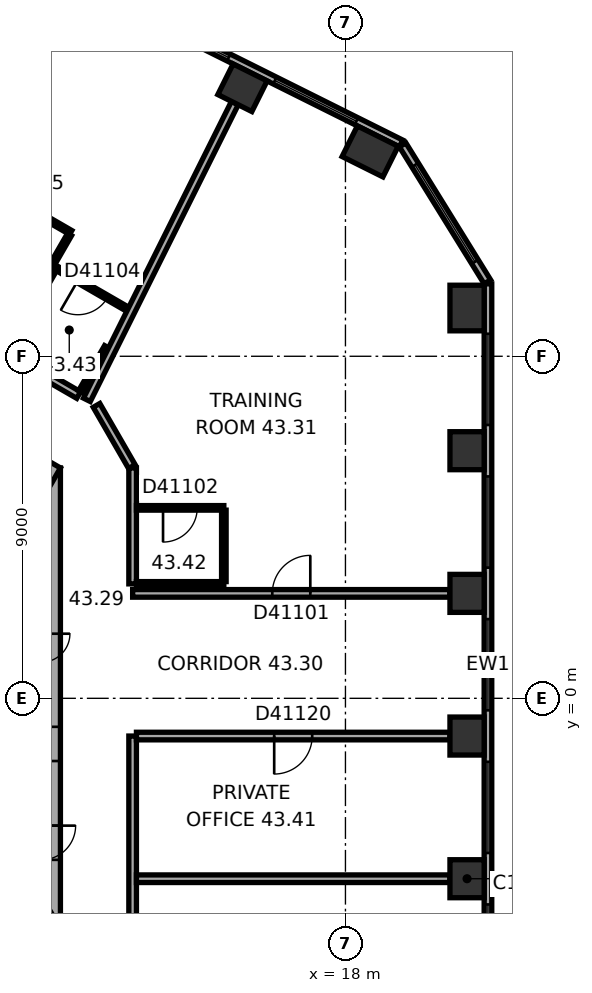
"""IFC4 building model, lengths in metres.
Left out: names, types, materials, properties, quantities, classifications, styles, units other than length and angle.
Written with IfcOpenShell. Run it as: python <this file> out.ifc"""

import sys

from ifc_helpers import new_model, si_unit, direction, frame, frame_2d, origin, origin_2d, place, context, subcontext, project, spatial, rectangle, extrude, element, fill, save


model = new_model("IFC4")
c1 = context("Model", 3, precision=1e-05, world=origin(), true_north=direction((0.0, 1.0)))
c2 = subcontext(c1, "Body", "Model", "MODEL_VIEW")
j1 = project(units=[si_unit("LENGTHUNIT", "METRE"), si_unit("PLANEANGLEUNIT", "RADIAN")], contexts=[c1])
p1 = place(None, origin())
s1 = spatial("IfcSite", under=j1, at=p1, CompositionType="ELEMENT")
p2 = place(p1, origin())
s2 = spatial("IfcBuilding", under=s1, at=p2, CompositionType="ELEMENT")
p3 = place(p2, frame((0.0, 0.0, 176.2)))
s3 = spatial("IfcBuildingStorey", under=s2, at=p3, CompositionType="ELEMENT", Elevation=176.2)
for number, where, z_axis, x_axis in (
    (1, (21.2, -4.747, 0.0), (0.0, 0.0, 1.0), (0.0, 1.0, 0.0)),
    (2, (21.2, -0.993, 0.0), (0.0, 0.0, 1.0), (0.0, 1.0, 0.0)),
    (3, (21.2, 2.761, 0.0), (0.0, 0.0, 1.0), (0.0, 1.0, 0.0)),
    (4, (21.2, 6.515, 0.0), (0.0, 0.0, 1.0), (0.0, 1.0, 0.0)),
):
    element("IfcColumn", number, at=place(p3, frame(where, z_axis=z_axis, x_axis=x_axis)), inside=s3, PredefinedType="COLUMN", context=c2, shape_type="SweptSolid", body=[
        extrude(rectangle(XDim=1.0, YDim=0.9, at=origin_2d()), origin(), (0.0, 0.0, 1.0), 3.7),
    ])
for number, where, z_axis, x_axis in (
    (5, (21.2, 10.27, 0.0), (0.0, 0.0, 1.0), (0.0, 1.0, 0.0)),
    (6, (18.65, 14.39, 0.0), (0.0, 0.0, 1.0), (-0.895, 0.446, 0.0)),
):
    element("IfcColumn", number, at=place(p3, frame(where, z_axis=z_axis, x_axis=x_axis)), inside=s3, PredefinedType="COLUMN", context=c2, shape_type="SweptSolid", body=[
        extrude(rectangle(XDim=1.2, YDim=0.9, at=origin_2d()), origin(), (0.0, 0.0, 1.0), 3.7),
    ])
p4 = place(p3, frame((15.29, 16.065, 0.0), z_axis=(0.0, 0.0, 1.0), x_axis=(-0.894934361602, 0.44619781311, 0.0)))
e7 = element("IfcColumn", 7, at=p4, inside=s3, PredefinedType="COLUMN", context=c2, shape_type="SweptSolid", body=[
    extrude(rectangle(XDim=1.0, YDim=0.9, at=origin_2d()), origin(), (0.0, 0.0, 1.0), 3.7),
])
p5 = place(p3, frame((10.0, -6.062, 0.0), z_axis=(0.0, 0.0, 1.0), x_axis=(0.0, 1.0, 0.0)))
e8 = element("IfcWall", 8, at=p5, inside=s3, PredefinedType="SHEAR", context=c2, shape_type="SweptSolid", body=[
    extrude(rectangle(XDim=12.125, YDim=1.0, at=frame_2d((6.062, 0.0))), origin(), (0.0, 0.0, 1.0), 3.7),
])
p6 = place(p5, frame((6.262, 0.0, 0.0)))
e9 = element("IfcOpeningElement", 9, at=p6, cuts=e8, PredefinedType="OPENING", context=c2, shape_type="SweptSolid", body=[
    extrude(rectangle(XDim=1.5, YDim=2.1, at=frame_2d((0.75, 1.05))), frame((0.0, 0.51, 0.0), z_axis=(0.0, -1.0, 0.0), x_axis=(1.0, 0.0, 0.0)), (0.0, 0.0, 1.0), 1.02),
])
p7 = place(p5, frame((1.812, 0.0, 0.0)))
e10 = element("IfcOpeningElement", 10, at=p7, cuts=e8, PredefinedType="OPENING", context=c2, shape_type="SweptSolid", body=[
    extrude(rectangle(XDim=0.9, YDim=2.1, at=frame_2d((0.45, 1.05))), frame((0.0, 0.51, 0.0), z_axis=(0.0, -1.0, 0.0), x_axis=(1.0, 0.0, 0.0)), (0.0, 0.0, 1.0), 1.02),
])
p8 = place(p5, frame((4.412, 0.0, 0.0)))
e11 = element("IfcOpeningElement", 11, at=p8, cuts=e8, PredefinedType="OPENING", context=c2, shape_type="SweptSolid", body=[
    extrude(rectangle(XDim=0.9, YDim=2.1, at=frame_2d((0.45, 1.05))), frame((0.0, 0.51, 0.0), z_axis=(0.0, -1.0, 0.0), x_axis=(1.0, 0.0, 0.0)), (0.0, 0.0, 1.0), 1.02),
])
p9 = place(p3, frame((10.25, 5.629, 0.0), z_axis=(0.0, 0.0, 1.0), x_axis=(-0.866022616891, 0.50000482701, 0.0)))
e12 = element("IfcWall", 12, at=p9, inside=s3, PredefinedType="SHEAR", context=c2, shape_type="SweptSolid", body=[
    extrude(rectangle(XDim=12.125, YDim=1.0, at=frame_2d((6.062, 0.0))), origin(), (0.0, 0.0, 1.0), 3.7),
])
p10 = place(p9, frame((4.012, 0.0, 0.0)))
e13 = element("IfcOpeningElement", 13, at=p10, cuts=e12, PredefinedType="OPENING", context=c2, shape_type="SweptSolid", body=[
    extrude(rectangle(XDim=0.9, YDim=2.1, at=frame_2d((0.45, 1.05))), frame((0.0, 0.51, 0.0), z_axis=(0.0, -1.0, 0.0), x_axis=(1.0, 0.0, 0.0)), (0.0, 0.0, 1.0), 1.02),
])
p11 = place(p9, frame((7.912, 0.0, 0.0)))
e14 = element("IfcOpeningElement", 14, at=p11, cuts=e12, PredefinedType="OPENING", context=c2, shape_type="SweptSolid", body=[
    extrude(rectangle(XDim=0.9, YDim=2.1, at=frame_2d((0.45, 1.05))), frame((0.0, 0.51, 0.0), z_axis=(0.0, -1.0, 0.0), x_axis=(1.0, 0.0, 0.0)), (0.0, 0.0, 1.0), 1.02),
])
p12 = place(p3, frame((-0.25, -11.691, 0.0), z_axis=(0.0, 0.0, 1.0), x_axis=(0.866022616891, 0.50000482701, 0.0)))
e15 = element("IfcWall", 15, at=p12, inside=s3, PredefinedType="SHEAR", context=c2, shape_type="SweptSolid", body=[
    extrude(rectangle(XDim=12.125, YDim=1.0, at=frame_2d((6.062, 0.0))), origin(), (0.0, 0.0, 1.0), 3.7),
])
p13 = place(p12, frame((2.612, 0.0, 0.0)))
e16 = element("IfcOpeningElement", 16, at=p13, cuts=e15, PredefinedType="OPENING", context=c2, shape_type="SweptSolid", body=[
    extrude(rectangle(XDim=1.1, YDim=2.1, at=frame_2d((0.55, 1.05))), frame((0.0, 0.51, 0.0), z_axis=(0.0, -1.0, 0.0), x_axis=(1.0, 0.0, 0.0)), (0.0, 0.0, 1.0), 1.02),
])
p14 = place(p12, frame((5.212, 0.0, 0.0)))
e17 = element("IfcOpeningElement", 17, at=p14, cuts=e15, PredefinedType="OPENING", context=c2, shape_type="SweptSolid", body=[
    extrude(rectangle(XDim=1.1, YDim=2.1, at=frame_2d((0.55, 1.05))), frame((0.0, 0.51, 0.0), z_axis=(0.0, -1.0, 0.0), x_axis=(1.0, 0.0, 0.0)), (0.0, 0.0, 1.0), 1.02),
])
p15 = place(p12, frame((7.812, 0.0, 0.0)))
e18 = element("IfcOpeningElement", 18, at=p15, cuts=e15, PredefinedType="OPENING", context=c2, shape_type="SweptSolid", body=[
    extrude(rectangle(XDim=1.1, YDim=2.1, at=frame_2d((0.55, 1.05))), frame((0.0, 0.51, 0.0), z_axis=(0.0, -1.0, 0.0), x_axis=(1.0, 0.0, 0.0)), (0.0, 0.0, 1.0), 1.02),
])
p16 = place(p3, frame((21.75, -9.138, 0.0), z_axis=(0.0, 0.0, 1.0), x_axis=(0.0, 1.0, 0.0)))
e19 = element("IfcWall", 19, at=p16, inside=s3, PredefinedType="STANDARD", context=c2, shape_type="SweptSolid", body=[
    extrude(rectangle(XDim=20.044, YDim=0.2, at=frame_2d((10.022, 0.0))), origin(), (0.0, 0.0, 1.0), 3.7),
])
p17 = place(p16, frame((1.314, 0.0, 0.9)))
e20 = element("IfcOpeningElement", 20, at=p17, cuts=e19, PredefinedType="OPENING", context=c2, shape_type="SweptSolid", body=[
    extrude(rectangle(XDim=2.4, YDim=2.0, at=frame_2d((1.2, 1.0))), frame((0.0, 0.11, 0.0), z_axis=(0.0, -1.0, 0.0), x_axis=(1.0, 0.0, 0.0)), (0.0, 0.0, 1.0), 0.22),
])
p18 = place(p16, frame((5.069, 0.0, 0.9)))
e21 = element("IfcOpeningElement", 21, at=p18, cuts=e19, PredefinedType="OPENING", context=c2, shape_type="SweptSolid", body=[
    extrude(rectangle(XDim=2.4, YDim=2.0, at=frame_2d((1.2, 1.0))), frame((0.0, 0.11, 0.0), z_axis=(0.0, -1.0, 0.0), x_axis=(1.0, 0.0, 0.0)), (0.0, 0.0, 1.0), 0.22),
])
p19 = place(p16, frame((8.823, 0.0, 0.9)))
e22 = element("IfcOpeningElement", 22, at=p19, cuts=e19, PredefinedType="OPENING", context=c2, shape_type="SweptSolid", body=[
    extrude(rectangle(XDim=2.4, YDim=2.0, at=frame_2d((1.2, 1.0))), frame((0.0, 0.11, 0.0), z_axis=(0.0, -1.0, 0.0), x_axis=(1.0, 0.0, 0.0)), (0.0, 0.0, 1.0), 0.22),
])
p20 = place(p16, frame((12.577, 0.0, 0.9)))
e23 = element("IfcOpeningElement", 23, at=p20, cuts=e19, PredefinedType="OPENING", context=c2, shape_type="SweptSolid", body=[
    extrude(rectangle(XDim=2.4, YDim=2.0, at=frame_2d((1.2, 1.0))), frame((0.0, 0.11, 0.0), z_axis=(0.0, -1.0, 0.0), x_axis=(1.0, 0.0, 0.0)), (0.0, 0.0, 1.0), 0.22),
])
p21 = place(p16, frame((16.331, 0.0, 0.9)))
e24 = element("IfcOpeningElement", 24, at=p21, cuts=e19, PredefinedType="OPENING", context=c2, shape_type="SweptSolid", body=[
    extrude(rectangle(XDim=2.4, YDim=2.0, at=frame_2d((1.2, 1.0))), frame((0.0, 0.11, 0.0), z_axis=(0.0, -1.0, 0.0), x_axis=(1.0, 0.0, 0.0)), (0.0, 0.0, 1.0), 0.22),
])
p22 = place(p3, frame((21.735, 10.958, 0.0), z_axis=(0.0, 0.0, 1.0), x_axis=(-0.526213807775, 0.850352296702, 0.0)))
e25 = element("IfcWall", 25, at=p22, inside=s3, PredefinedType="STANDARD", context=c2, shape_type="SweptSolid", body=[
    extrude(rectangle(XDim=4.238, YDim=0.2, at=frame_2d((2.119, 0.0))), origin(), (0.0, 0.0, 1.0), 3.7),
])
p23 = place(p22, frame((0.619, 0.0, 0.9)))
e26 = element("IfcOpeningElement", 26, at=p23, cuts=e25, PredefinedType="OPENING", context=c2, shape_type="SweptSolid", body=[
    extrude(rectangle(XDim=3.0, YDim=2.0, at=frame_2d((1.5, 1.0))), frame((0.0, 0.11, 0.0), z_axis=(0.0, -1.0, 0.0), x_axis=(1.0, 0.0, 0.0)), (0.0, 0.0, 1.0), 0.22),
])
p24 = place(p3, frame((19.464, 14.599, 0.0), z_axis=(0.0, 0.0, 1.0), x_axis=(-0.894935755043, 0.446195018289, 0.0)))
e27 = element("IfcWall", 27, at=p24, inside=s3, PredefinedType="STANDARD", context=c2, shape_type="SweptSolid", body=[
    extrude(rectangle(XDim=20.044, YDim=0.2, at=frame_2d((10.022, 0.0))), origin(), (0.0, 0.0, 1.0), 3.7),
])
p25 = place(p24, frame((1.313, 0.0, 0.9)))
e28 = element("IfcOpeningElement", 28, at=p25, cuts=e27, PredefinedType="OPENING", context=c2, shape_type="SweptSolid", body=[
    extrude(rectangle(XDim=2.4, YDim=2.0, at=frame_2d((1.2, 1.0))), frame((0.0, 0.11, 0.0), z_axis=(0.0, -1.0, 0.0), x_axis=(1.0, 0.0, 0.0)), (0.0, 0.0, 1.0), 0.22),
])
p26 = place(p24, frame((5.067, 0.0, 0.9)))
e29 = element("IfcOpeningElement", 29, at=p26, cuts=e27, PredefinedType="OPENING", context=c2, shape_type="SweptSolid", body=[
    extrude(rectangle(XDim=2.4, YDim=2.0, at=frame_2d((1.2, 1.0))), frame((0.0, 0.11, 0.0), z_axis=(0.0, -1.0, 0.0), x_axis=(1.0, 0.0, 0.0)), (0.0, 0.0, 1.0), 0.22),
])
p27 = place(p24, frame((8.821, 0.0, 0.9)))
e30 = element("IfcOpeningElement", 30, at=p27, cuts=e27, PredefinedType="OPENING", context=c2, shape_type="SweptSolid", body=[
    extrude(rectangle(XDim=2.4, YDim=2.0, at=frame_2d((1.2, 1.0))), frame((0.0, 0.11, 0.0), z_axis=(0.0, -1.0, 0.0), x_axis=(1.0, 0.0, 0.0)), (0.0, 0.0, 1.0), 0.22),
])
p28 = place(p24, frame((12.575, 0.0, 0.9)))
e31 = element("IfcOpeningElement", 31, at=p28, cuts=e27, PredefinedType="OPENING", context=c2, shape_type="SweptSolid", body=[
    extrude(rectangle(XDim=2.4, YDim=2.0, at=frame_2d((1.2, 1.0))), frame((0.0, 0.11, 0.0), z_axis=(0.0, -1.0, 0.0), x_axis=(1.0, 0.0, 0.0)), (0.0, 0.0, 1.0), 0.22),
])
p29 = place(p24, frame((16.329, 0.0, 0.9)))
e32 = element("IfcOpeningElement", 32, at=p29, cuts=e27, PredefinedType="OPENING", context=c2, shape_type="SweptSolid", body=[
    extrude(rectangle(XDim=2.4, YDim=2.0, at=frame_2d((1.2, 1.0))), frame((0.0, 0.11, 0.0), z_axis=(0.0, -1.0, 0.0), x_axis=(1.0, 0.0, 0.0)), (0.0, 0.0, 1.0), 0.22),
])
p30 = place(p3, frame((7.878, 13.927, 0.0), z_axis=(0.0, 0.0, 1.0), x_axis=(0.866021245731, -0.500007201891, 0.0)))
e33 = element("IfcWall", 33, at=p30, inside=s3, PredefinedType="PARTITIONING", context=c2, shape_type="SweptSolid", body=[
    extrude(rectangle(XDim=3.34, YDim=0.12, at=frame_2d((1.67, 0.0))), origin(), (0.0, 0.0, 1.0), 3.42),
])
p31 = place(p30, frame((1.22, 0.0, 0.0)))
e34 = element("IfcOpeningElement", 34, at=p31, cuts=e33, PredefinedType="OPENING", context=c2, shape_type="SweptSolid", body=[
    extrude(rectangle(XDim=0.9, YDim=2.1, at=frame_2d((0.45, 1.05))), frame((0.0, 0.07, 0.0), z_axis=(0.0, -1.0, 0.0), x_axis=(1.0, 0.0, 0.0)), (0.0, 0.0, 1.0), 0.14),
])
p32 = place(p3, frame((9.125, 9.166, 0.0), z_axis=(0.0, 0.0, 1.0), x_axis=(0.500004234368, 0.866022959057, 0.0)))
e35 = element("IfcWall", 35, at=p32, inside=s3, PredefinedType="PARTITIONING", context=c2, shape_type="SweptSolid", body=[
    extrude(rectangle(XDim=2.5, YDim=0.12, at=frame_2d((1.25, 0.0))), origin(), (0.0, 0.0, 1.0), 3.42),
])
p33 = place(p3, frame((10.427, 11.301, 0.0), z_axis=(0.0, 0.0, 1.0), x_axis=(0.866019511163, -0.500010206181, 0.0)))
e36 = element("IfcWall", 36, at=p33, inside=s3, PredefinedType="PARTITIONING", context=c2, shape_type="SweptSolid", body=[
    extrude(rectangle(XDim=2.13, YDim=0.12, at=frame_2d((1.065, 0.0))), origin(), (0.0, 0.0, 1.0), 3.42),
])
p34 = place(p33, frame((0.615, 0.0, 0.0)))
e37 = element("IfcOpeningElement", 37, at=p34, cuts=e36, PredefinedType="OPENING", context=c2, shape_type="SweptSolid", body=[
    extrude(rectangle(XDim=0.9, YDim=2.1, at=frame_2d((0.45, 1.05))), frame((0.0, 0.07, 0.0), z_axis=(0.0, -1.0, 0.0), x_axis=(1.0, 0.0, 0.0)), (0.0, 0.0, 1.0), 0.14),
])
p35 = place(p3, frame((10.74, 12.205, 0.0), z_axis=(0.0, 0.0, 1.0), x_axis=(-0.499978425106, -0.866037859697, 0.0)))
e38 = element("IfcWall", 38, at=p35, inside=s3, PredefinedType="PARTITIONING", context=c2, shape_type="SweptSolid", body=[
    extrude(rectangle(XDim=3.44, YDim=0.12, at=frame_2d((1.72, 0.0))), origin(), (0.0, 0.0, 1.0), 3.42),
])
p36 = place(p3, frame((10.98, 7.979, 0.0), z_axis=(0.0, 0.0, 1.0), x_axis=(-0.866008176907, 0.50002983664, 0.0)))
e39 = element("IfcWall", 39, at=p36, inside=s3, PredefinedType="PARTITIONING", context=c2, shape_type="SweptSolid", body=[
    extrude(rectangle(XDim=2.2, YDim=0.2, at=frame_2d((1.1, 0.0))), origin(), (0.0, 0.0, 1.0), 3.42),
])
p37 = place(p3, frame((11.714, 9.25, 0.0), z_axis=(0.0, 0.0, 1.0), x_axis=(-0.500015945769, -0.866016197294, 0.0)))
e40 = element("IfcWall", 40, at=p37, inside=s3, PredefinedType="PARTITIONING", context=c2, shape_type="SweptSolid", body=[
    extrude(rectangle(XDim=1.368, YDim=0.12, at=frame_2d((0.684, 0.0))), origin(), (0.0, 0.0, 1.0), 3.42),
])
p38 = place(p3, frame((12.38, 6.097, 0.0), z_axis=(0.0, 0.0, 1.0), x_axis=(-0.499964847546, 0.866045698112, 0.0)))
e41 = element("IfcWall", 41, at=p38, inside=s3, PredefinedType="PARTITIONING", context=c2, shape_type="SweptSolid", body=[
    extrude(rectangle(XDim=1.86, YDim=0.2, at=frame_2d((0.93, 0.0))), origin(), (0.0, 0.0, 1.0), 3.42),
])
p39 = place(p3, frame((12.4, -6.022, 0.0), z_axis=(0.0, 0.0, 1.0), x_axis=(0.0, 1.0, 0.0)))
e42 = element("IfcWall", 42, at=p39, inside=s3, PredefinedType="PARTITIONING", context=c2, shape_type="SweptSolid", body=[
    extrude(rectangle(XDim=5.029, YDim=0.2, at=frame_2d((2.515, 0.0))), origin(), (0.0, 0.0, 1.0), 3.42),
])
p40 = place(p3, frame((12.4, 3.011, 0.0), z_axis=(0.0, 0.0, 1.0), x_axis=(0.0, 1.0, 0.0)))
e43 = element("IfcWall", 43, at=p40, inside=s3, PredefinedType="PARTITIONING", context=c2, shape_type="SweptSolid", body=[
    extrude(rectangle(XDim=3.051, YDim=0.2, at=frame_2d((1.525, 0.0))), origin(), (0.0, 0.0, 1.0), 3.42),
])
p41 = place(p3, frame((12.5, -0.993, 0.0), z_axis=(0.0, 0.0, 1.0), x_axis=(1.0, 0.0, 0.0)))
e44 = element("IfcWall", 44, at=p41, inside=s3, PredefinedType="PARTITIONING", context=c2, shape_type="SweptSolid", body=[
    extrude(rectangle(XDim=8.25, YDim=0.2, at=frame_2d((4.125, 0.0))), origin(), (0.0, 0.0, 1.0), 2.87),
])
p42 = place(p41, frame((3.625, 0.0, 0.0)))
e45 = element("IfcOpeningElement", 45, at=p42, cuts=e44, PredefinedType="OPENING", context=c2, shape_type="SweptSolid", body=[
    extrude(rectangle(XDim=1.0, YDim=2.1, at=frame_2d((0.5, 1.05))), frame((0.0, 0.11, 0.0), z_axis=(0.0, -1.0, 0.0), x_axis=(1.0, 0.0, 0.0)), (0.0, 0.0, 1.0), 0.22),
])
p43 = place(p3, frame((12.5, 5.011, 0.0), z_axis=(0.0, 0.0, 1.0), x_axis=(1.0, 0.0, 0.0)))
e46 = element("IfcWall", 46, at=p43, inside=s3, PredefinedType="PARTITIONING", context=c2, shape_type="SweptSolid", body=[
    extrude(rectangle(XDim=2.3, YDim=0.12, at=frame_2d((1.15, 0.0))), origin(), (0.0, 0.0, 1.0), 3.42),
])
p44 = place(p43, frame((0.7, 0.0, 0.0)))
e47 = element("IfcOpeningElement", 47, at=p44, cuts=e46, PredefinedType="OPENING", context=c2, shape_type="SweptSolid", body=[
    extrude(rectangle(XDim=0.9, YDim=2.1, at=frame_2d((0.45, 1.05))), frame((0.0, 0.07, 0.0), z_axis=(0.0, -1.0, 0.0), x_axis=(1.0, 0.0, 0.0)), (0.0, 0.0, 1.0), 0.14),
])
p45 = place(p3, frame((14.8, 3.011, 0.0), z_axis=(0.0, 0.0, 1.0), x_axis=(-1.0, 0.0, 0.0)))
e48 = element("IfcWall", 48, at=p45, inside=s3, PredefinedType="PARTITIONING", context=c2, shape_type="SweptSolid", body=[
    extrude(rectangle(XDim=2.3, YDim=0.12, at=frame_2d((1.15, 0.0))), origin(), (0.0, 0.0, 1.0), 3.42),
])
p46 = place(p3, frame((14.8, 4.951, 0.0), z_axis=(0.0, 0.0, 1.0), x_axis=(0.0, -1.0, 0.0)))
e49 = element("IfcWall", 49, at=p46, inside=s3, PredefinedType="PARTITIONING", context=c2, shape_type="SweptSolid", body=[
    extrude(rectangle(XDim=1.88, YDim=0.12, at=frame_2d((0.94, 0.0))), origin(), (0.0, 0.0, 1.0), 3.42),
])
p47 = place(p3, frame((15.09, 15.663, 0.0), z_axis=(0.0, 0.0, 1.0), x_axis=(-0.446206011687, -0.894930273895, 0.0)))
e50 = element("IfcWall", 50, at=p47, inside=s3, PredefinedType="PARTITIONING", context=c2, shape_type="SweptSolid", body=[
    extrude(rectangle(XDim=8.725, YDim=0.2, at=frame_2d((4.363, 0.0))), origin(), (0.0, 0.0, 1.0), 3.42),
])
p48 = place(p3, frame((20.75, -4.747, 0.0), z_axis=(0.0, 0.0, 1.0), x_axis=(-1.0, 0.0, 0.0)))
e51 = element("IfcWall", 51, at=p48, inside=s3, PredefinedType="PARTITIONING", context=c2, shape_type="SweptSolid", body=[
    extrude(rectangle(XDim=8.25, YDim=0.2, at=frame_2d((4.125, 0.0))), origin(), (0.0, 0.0, 1.0), 3.42),
])
p49 = place(p3, frame((20.75, 2.761, 0.0), z_axis=(0.0, 0.0, 1.0), x_axis=(-1.0, 0.0, 0.0)))
e52 = element("IfcWall", 52, at=p49, inside=s3, PredefinedType="PARTITIONING", context=c2, shape_type="SweptSolid", body=[
    extrude(rectangle(XDim=8.35, YDim=0.2, at=frame_2d((4.175, 0.0))), origin(), (0.0, 0.0, 1.0), 3.42),
])
p50 = place(p49, frame((3.675, 0.0, 0.0)))
e53 = element("IfcOpeningElement", 53, at=p50, cuts=e52, PredefinedType="OPENING", context=c2, shape_type="SweptSolid", body=[
    extrude(rectangle(XDim=1.0, YDim=2.1, at=frame_2d((0.5, 1.05))), frame((0.0, 0.11, 0.0), z_axis=(0.0, -1.0, 0.0), x_axis=(1.0, 0.0, 0.0)), (0.0, 0.0, 1.0), 0.22),
])
p51 = place(p17, origin())
e54 = element("IfcWindow", 54, at=p51, inside=s3, PartitioningType="SINGLE_PANEL", PredefinedType="WINDOW", context=c2, shape_type="SweptSolid", body=[
    extrude(rectangle(XDim=2.4, YDim=2.0, at=frame_2d((1.2, 1.0))), frame((0.0, 0.03, 0.0), z_axis=(0.0, -1.0, 0.0), x_axis=(1.0, 0.0, 0.0)), (0.0, 0.0, 1.0), 0.06),
])
fill(e20, e54)
p52 = place(p18, origin())
e55 = element("IfcWindow", 55, at=p52, inside=s3, PartitioningType="SINGLE_PANEL", PredefinedType="WINDOW", context=c2, shape_type="SweptSolid", body=[
    extrude(rectangle(XDim=2.4, YDim=2.0, at=frame_2d((1.2, 1.0))), frame((0.0, 0.03, 0.0), z_axis=(0.0, -1.0, 0.0), x_axis=(1.0, 0.0, 0.0)), (0.0, 0.0, 1.0), 0.06),
])
fill(e21, e55)
p53 = place(p19, origin())
e56 = element("IfcWindow", 56, at=p53, inside=s3, PartitioningType="SINGLE_PANEL", PredefinedType="WINDOW", context=c2, shape_type="SweptSolid", body=[
    extrude(rectangle(XDim=2.4, YDim=2.0, at=frame_2d((1.2, 1.0))), frame((0.0, 0.03, 0.0), z_axis=(0.0, -1.0, 0.0), x_axis=(1.0, 0.0, 0.0)), (0.0, 0.0, 1.0), 0.06),
])
fill(e22, e56)
p54 = place(p20, origin())
e57 = element("IfcWindow", 57, at=p54, inside=s3, PartitioningType="SINGLE_PANEL", PredefinedType="WINDOW", context=c2, shape_type="SweptSolid", body=[
    extrude(rectangle(XDim=2.4, YDim=2.0, at=frame_2d((1.2, 1.0))), frame((0.0, 0.03, 0.0), z_axis=(0.0, -1.0, 0.0), x_axis=(1.0, 0.0, 0.0)), (0.0, 0.0, 1.0), 0.06),
])
fill(e23, e57)
p55 = place(p21, origin())
e58 = element("IfcWindow", 58, at=p55, inside=s3, PartitioningType="SINGLE_PANEL", PredefinedType="WINDOW", context=c2, shape_type="SweptSolid", body=[
    extrude(rectangle(XDim=2.4, YDim=2.0, at=frame_2d((1.2, 1.0))), frame((0.0, 0.03, 0.0), z_axis=(0.0, -1.0, 0.0), x_axis=(1.0, 0.0, 0.0)), (0.0, 0.0, 1.0), 0.06),
])
fill(e24, e58)
p56 = place(p23, origin())
e59 = element("IfcWindow", 59, at=p56, inside=s3, PartitioningType="SINGLE_PANEL", PredefinedType="WINDOW", context=c2, shape_type="SweptSolid", body=[
    extrude(rectangle(XDim=3.0, YDim=2.0, at=frame_2d((1.5, 1.0))), frame((0.0, 0.03, 0.0), z_axis=(0.0, -1.0, 0.0), x_axis=(1.0, 0.0, 0.0)), (0.0, 0.0, 1.0), 0.06),
])
fill(e26, e59)
p57 = place(p25, origin())
e60 = element("IfcWindow", 60, at=p57, inside=s3, PartitioningType="SINGLE_PANEL", PredefinedType="WINDOW", context=c2, shape_type="SweptSolid", body=[
    extrude(rectangle(XDim=2.4, YDim=2.0, at=frame_2d((1.2, 1.0))), frame((0.0, 0.03, 0.0), z_axis=(0.0, -1.0, 0.0), x_axis=(1.0, 0.0, 0.0)), (0.0, 0.0, 1.0), 0.06),
])
fill(e28, e60)
p58 = place(p26, origin())
e61 = element("IfcWindow", 61, at=p58, inside=s3, PartitioningType="SINGLE_PANEL", PredefinedType="WINDOW", context=c2, shape_type="SweptSolid", body=[
    extrude(rectangle(XDim=2.4, YDim=2.0, at=frame_2d((1.2, 1.0))), frame((0.0, 0.03, 0.0), z_axis=(0.0, -1.0, 0.0), x_axis=(1.0, 0.0, 0.0)), (0.0, 0.0, 1.0), 0.06),
])
fill(e29, e61)
p59 = place(p50, origin())
e62 = element("IfcDoor", 62, at=p59, inside=s3, OperationType="SINGLE_SWING_LEFT", PredefinedType="DOOR", context=c2, shape_type="SweptSolid", body=[
    extrude(rectangle(XDim=1.0, YDim=2.1, at=frame_2d((0.5, 1.05))), frame((0.0, 0.025, 0.0), z_axis=(0.0, -1.0, 0.0), x_axis=(1.0, 0.0, 0.0)), (0.0, 0.0, 1.0), 0.05),
])
fill(e53, e62)
p60 = place(p44, origin())
e63 = element("IfcDoor", 63, at=p60, inside=s3, OperationType="SINGLE_SWING_LEFT", PredefinedType="DOOR", context=c2, shape_type="SweptSolid", body=[
    extrude(rectangle(XDim=0.9, YDim=2.1, at=frame_2d((0.45, 1.05))), frame((0.0, 0.025, 0.0), z_axis=(0.0, -1.0, 0.0), x_axis=(1.0, 0.0, 0.0)), (0.0, 0.0, 1.0), 0.05),
])
fill(e47, e63)
p61 = place(p34, origin())
e64 = element("IfcDoor", 64, at=p61, inside=s3, OperationType="SINGLE_SWING_LEFT", PredefinedType="DOOR", context=c2, shape_type="SweptSolid", body=[
    extrude(rectangle(XDim=0.9, YDim=2.1, at=frame_2d((0.45, 1.05))), frame((0.0, 0.025, 0.0), z_axis=(0.0, -1.0, 0.0), x_axis=(1.0, 0.0, 0.0)), (0.0, 0.0, 1.0), 0.05),
])
fill(e37, e64)
p62 = place(p42, origin())
e65 = element("IfcDoor", 65, at=p62, inside=s3, OperationType="SINGLE_SWING_LEFT", PredefinedType="DOOR", context=c2, shape_type="SweptSolid", body=[
    extrude(rectangle(XDim=1.0, YDim=2.1, at=frame_2d((0.5, 1.05))), frame((0.0, 0.025, 0.0), z_axis=(0.0, -1.0, 0.0), x_axis=(1.0, 0.0, 0.0)), (0.0, 0.0, 1.0), 0.05),
])
fill(e45, e65)
save(model, sys.argv[1])
